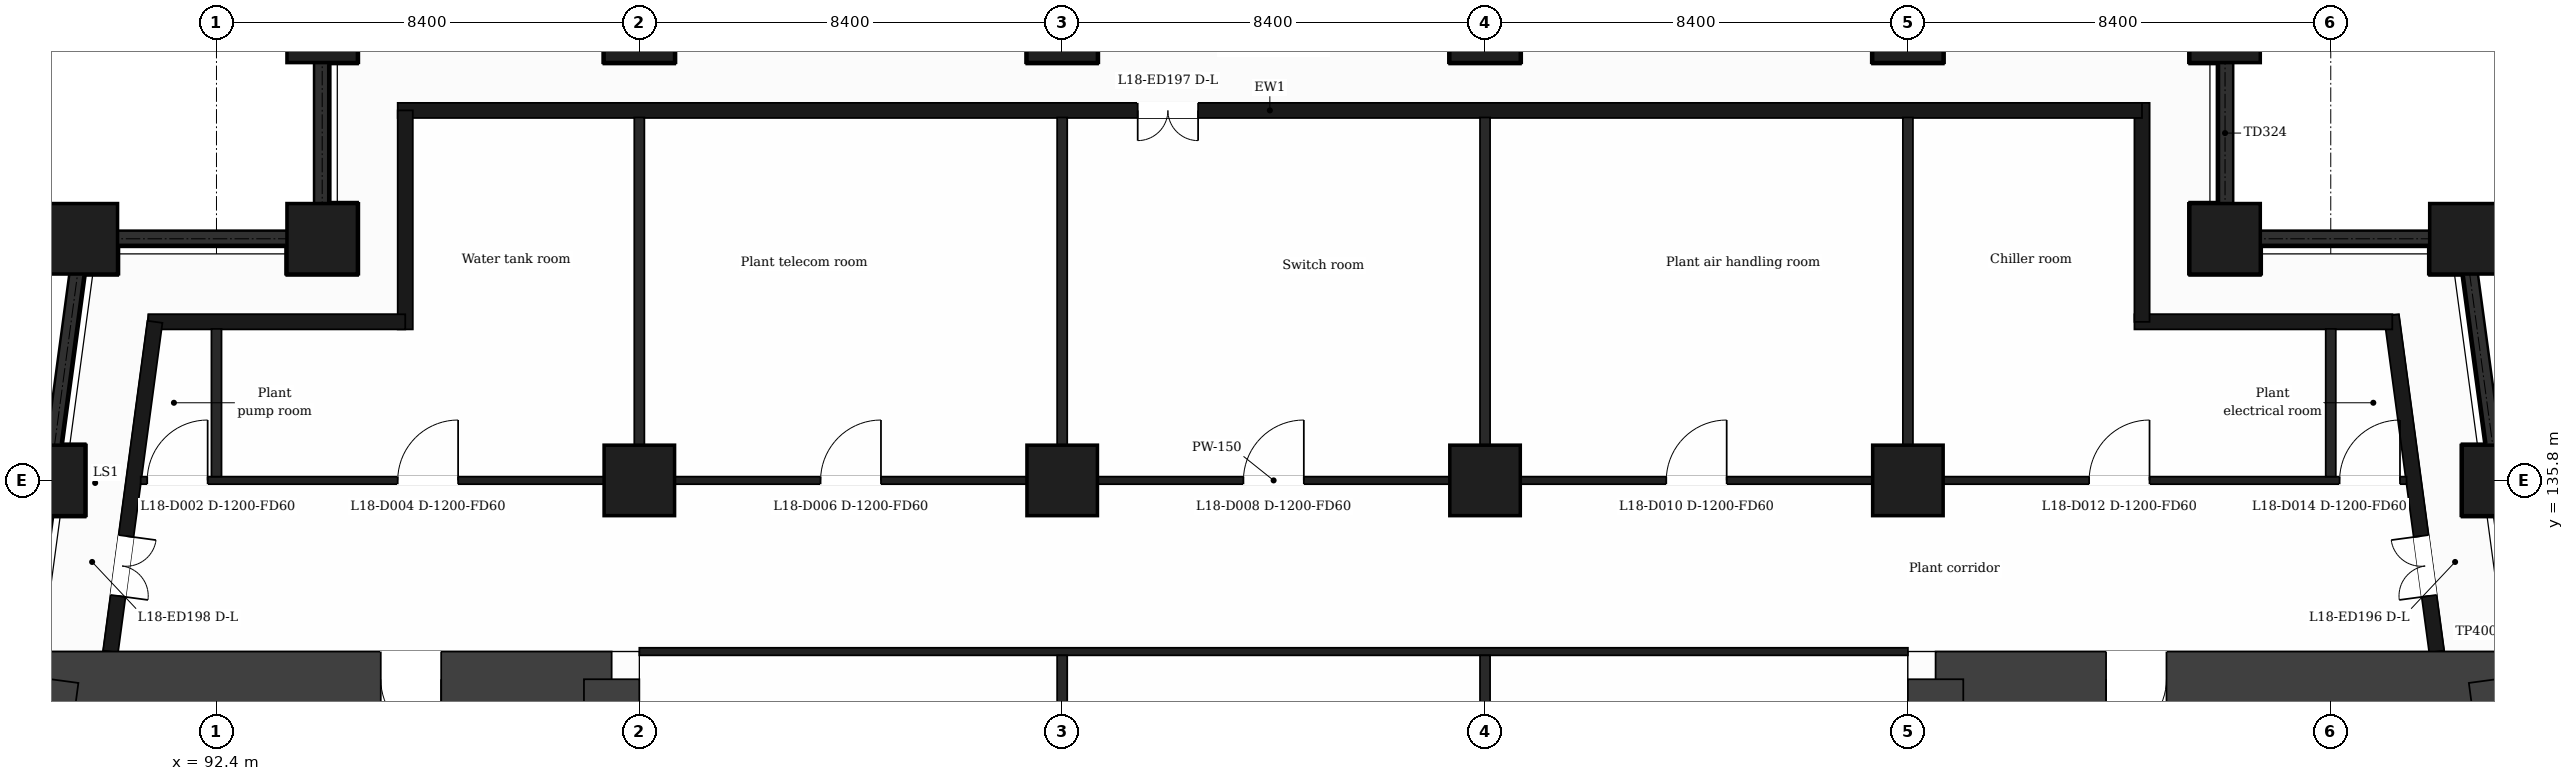
"""IFC4 building model, lengths in metres.
Left out: names, types, materials, properties, quantities, classifications, styles, units other than length and angle.
Written with IfcOpenShell. Run it as: python <this file> out.ifc"""

import sys

from ifc_helpers import new_model, si_unit, direction, frame, frame_2d, origin, origin_2d, place, context, subcontext, project, spatial, rectangle, extrude, element, fill, save


model = new_model("IFC4")
c1 = context("Model", 3, precision=1e-05, world=origin(), true_north=direction((0.0, 1.0)))
c2 = subcontext(c1, "Body", "Model", "MODEL_VIEW")
j1 = project(units=[si_unit("LENGTHUNIT", "METRE"), si_unit("PLANEANGLEUNIT", "RADIAN")], contexts=[c1])
p1 = place(None, origin())
s1 = spatial("IfcSite", under=j1, at=p1, CompositionType="ELEMENT")
p2 = place(p1, origin())
s2 = spatial("IfcBuilding", under=s1, at=p2, CompositionType="ELEMENT")
p3 = place(p2, frame((0.0, 0.0, 81.0)))
s3 = spatial("IfcBuildingStorey", under=s2, at=p3, CompositionType="ELEMENT", Elevation=81.0)
p4 = place(p3, frame((89.112, 131.85, 0.0), z_axis=(0.0, 0.0, 1.0), x_axis=(1.0, 0.0, 0.0)))
e1 = element("IfcWall", 1, at=p4, inside=s3, PredefinedType="SHEAR", context=c2, shape_type="SweptSolid", body=[
    extrude(rectangle(XDim=11.138, YDim=1.1, at=frame_2d((5.569, 0.0))), origin(), (0.0, 0.0, 1.0), 5.0),
])
p5 = place(p4, frame((6.552, 0.0, 0.0)))
e2 = element("IfcOpeningElement", 2, at=p5, cuts=e1, PredefinedType="OPENING", context=c2, shape_type="SweptSolid", body=[
    extrude(rectangle(XDim=1.2, YDim=2.1, at=frame_2d((0.6, 1.05))), frame((0.0, 0.56, 0.0), z_axis=(0.0, -1.0, 0.0), x_axis=(1.0, 0.0, 0.0)), (0.0, 0.0, 1.0), 1.12),
])
p6 = place(p3, frame((100.25, 131.85, 0.0), z_axis=(0.0, 0.0, 1.0), x_axis=(0.0, -1.0, 0.0)))
e3 = element("IfcWall", 3, at=p6, inside=s3, PredefinedType="SHEAR", context=c2, shape_type="SweptSolid", body=[
    extrude(rectangle(XDim=20.9, YDim=1.1, at=frame_2d((10.45, 0.0))), origin(), (0.0, 0.0, 1.0), 5.0),
])
p7 = place(p6, frame((18.55, 0.0, 0.0)))
e4 = element("IfcOpeningElement", 4, at=p7, cuts=e3, PredefinedType="OPENING", context=c2, shape_type="SweptSolid", body=[
    extrude(rectangle(XDim=1.2, YDim=2.1, at=frame_2d((0.6, 1.05))), frame((0.0, 0.56, 0.0), z_axis=(0.0, -1.0, 0.0), x_axis=(1.0, 0.0, 0.0)), (0.0, 0.0, 1.0), 1.12),
])
p8 = place(p6, frame((7.7, 0.0, 0.0)))
e5 = element("IfcOpeningElement", 5, at=p8, cuts=e3, PredefinedType="OPENING", context=c2, shape_type="SweptSolid", body=[
    extrude(rectangle(XDim=1.4, YDim=2.1, at=frame_2d((0.7, 1.05))), frame((0.0, 0.56, 0.0), z_axis=(0.0, -1.0, 0.0), x_axis=(1.0, 0.0, 0.0)), (0.0, 0.0, 1.0), 1.12),
])
p9 = place(p3, frame((86.298, 110.95, 0.0), z_axis=(0.0, 0.0, 1.0), x_axis=(0.133400422634, 0.99106222168, 0.0)))
e6 = element("IfcWall", 6, at=p9, inside=s3, PredefinedType="SHEAR", context=c2, shape_type="SweptSolid", body=[
    extrude(rectangle(XDim=21.089, YDim=1.1, at=frame_2d((10.544, 0.0))), origin(), (0.0, 0.0, 1.0), 5.0),
])
p10 = place(p3, frame((126.55, 131.85, 0.0), z_axis=(0.0, 0.0, 1.0), x_axis=(1.0, 0.0, 0.0)))
e7 = element("IfcWall", 7, at=p10, inside=s3, PredefinedType="SHEAR", context=c2, shape_type="SweptSolid", body=[
    extrude(rectangle(XDim=11.138, YDim=1.1, at=frame_2d((5.569, 0.0))), origin(), (0.0, 0.0, 1.0), 5.0),
])
p11 = place(p10, frame((3.386, 0.0, 0.0)))
e8 = element("IfcOpeningElement", 8, at=p11, cuts=e7, PredefinedType="OPENING", context=c2, shape_type="SweptSolid", body=[
    extrude(rectangle(XDim=1.2, YDim=2.1, at=frame_2d((0.6, 1.05))), frame((0.0, 0.56, 0.0), z_axis=(0.0, -1.0, 0.0), x_axis=(1.0, 0.0, 0.0)), (0.0, 0.0, 1.0), 1.12),
])
p12 = place(p3, frame((137.688, 131.85, 0.0), z_axis=(0.0, 0.0, 1.0), x_axis=(0.133411793472, -0.991060691059, 0.0)))
e9 = element("IfcWall", 9, at=p12, inside=s3, PredefinedType="SHEAR", context=c2, shape_type="SweptSolid", body=[
    extrude(rectangle(XDim=21.089, YDim=1.1, at=frame_2d((10.544, 0.0))), origin(), (0.0, 0.0, 1.0), 5.0),
])
p13 = place(p3, frame((126.55, 110.95, 0.0), z_axis=(0.0, 0.0, 1.0), x_axis=(0.0, 1.0, 0.0)))
e10 = element("IfcWall", 10, at=p13, inside=s3, PredefinedType="SHEAR", context=c2, shape_type="SweptSolid", body=[
    extrude(rectangle(XDim=20.9, YDim=1.1, at=frame_2d((10.45, 0.0))), origin(), (0.0, 0.0, 1.0), 5.0),
])
p14 = place(p13, frame((17.45, 0.0, 0.0)))
e11 = element("IfcOpeningElement", 11, at=p14, cuts=e10, PredefinedType="OPENING", context=c2, shape_type="SweptSolid", body=[
    extrude(rectangle(XDim=1.2, YDim=2.1, at=frame_2d((0.6, 1.05))), frame((0.0, 0.56, 0.0), z_axis=(0.0, -1.0, 0.0), x_axis=(1.0, 0.0, 0.0)), (0.0, 0.0, 1.0), 1.12),
])
p15 = place(p13, frame((11.8, 0.0, 0.0)))
e12 = element("IfcOpeningElement", 12, at=p15, cuts=e10, PredefinedType="OPENING", context=c2, shape_type="SweptSolid", body=[
    extrude(rectangle(XDim=1.4, YDim=2.1, at=frame_2d((0.7, 1.05))), frame((0.0, 0.56, 0.0), z_axis=(0.0, -1.0, 0.0), x_axis=(1.0, 0.0, 0.0)), (0.0, 0.0, 1.0), 1.12),
])
for number, where, z_axis, x_axis in (
    (13, (94.5, 140.6, 0.0), (0.0, 0.0, 1.0), (1.0, 0.0, 0.0)),
    (14, (132.3, 140.6, 0.0), (0.0, 0.0, 1.0), (1.0, 0.0, 0.0)),
    (15, (89.735, 140.6, 0.0), (0.0, 0.0, 1.0), (1.0, 0.0, 0.0)),
    (16, (137.065, 140.6, 0.0), (0.0, 0.0, 1.0), (1.0, 0.0, 0.0)),
    (17, (100.8, 135.8, 0.0), (0.0, 0.0, 1.0), (1.0, 0.0, 0.0)),
    (18, (109.2, 135.8, 0.0), (0.0, 0.0, 1.0), (1.0, 0.0, 0.0)),
    (19, (117.6, 135.8, 0.0), (0.0, 0.0, 1.0), (1.0, 0.0, 0.0)),
    (20, (126.0, 135.8, 0.0), (0.0, 0.0, 1.0), (1.0, 0.0, 0.0)),
    (21, (89.088, 135.8, 0.0), (0.0, 0.0, 1.0), (1.0, 0.0, 0.0)),
    (22, (137.711, 135.8, 0.0), (0.0, 0.0, 1.0), (1.0, 0.0, 0.0)),
    (23, (100.8, 144.8, 0.0), (0.0, 0.0, 1.0), (1.0, 0.0, 0.0)),
    (24, (109.2, 144.8, 0.0), (0.0, 0.0, 1.0), (1.0, 0.0, 0.0)),
    (25, (117.6, 144.8, 0.0), (0.0, 0.0, 1.0), (1.0, 0.0, 0.0)),
    (26, (126.0, 144.8, 0.0), (0.0, 0.0, 1.0), (1.0, 0.0, 0.0)),
    (27, (94.5, 144.8, 0.0), (0.0, 0.0, 1.0), (1.0, 0.0, 0.0)),
    (28, (132.3, 144.8, 0.0), (0.0, 0.0, 1.0), (1.0, 0.0, 0.0)),
):
    element("IfcColumn", number, at=place(p3, frame(where, z_axis=z_axis, x_axis=x_axis)), inside=s3, PredefinedType="COLUMN", context=c2, shape_type="SweptSolid", body=[
        extrude(rectangle(XDim=1.4, YDim=1.4, at=origin_2d()), origin(), (0.0, 0.0, 1.0), 5.0),
    ])
p16 = place(p3, frame((136.504, 132.4, 0.0), z_axis=(0.0, 0.0, 1.0), x_axis=(-0.133399697462, 0.99106231929, 0.0)))
e29 = element("IfcWall", 29, at=p16, inside=s3, PredefinedType="SOLIDWALL", context=c2, shape_type="SweptSolid", body=[
    extrude(rectangle(XDim=6.74, YDim=0.3, at=frame_2d((3.37, 0.0))), origin(), (0.0, 0.0, 1.0), 4.55),
])
p17 = place(p16, frame((1.115, 0.0, 0.0)))
e30 = element("IfcOpeningElement", 30, at=p17, cuts=e29, PredefinedType="OPENING", context=c2, shape_type="SweptSolid", body=[
    extrude(rectangle(XDim=1.2, YDim=2.4, at=frame_2d((0.6, 1.2))), frame((0.0, 0.16, 0.0), z_axis=(0.0, -1.0, 0.0), x_axis=(1.0, 0.0, 0.0)), (0.0, 0.0, 1.0), 0.32),
])
p18 = place(p3, frame((135.623, 138.95, 0.0), z_axis=(0.0, 0.0, 1.0), x_axis=(-1.0, 0.0, 0.0)))
e31 = element("IfcWall", 31, at=p18, inside=s3, PredefinedType="SOLIDWALL", context=c2, shape_type="SweptSolid", body=[
    extrude(rectangle(XDim=5.123, YDim=0.3, at=frame_2d((2.561, 0.0))), origin(), (0.0, 0.0, 1.0), 4.55),
])
p19 = place(p3, frame((130.65, 138.95, 0.0), z_axis=(0.0, 0.0, 1.0), x_axis=(0.0, 1.0, 0.0)))
e32 = element("IfcWall", 32, at=p19, inside=s3, PredefinedType="SOLIDWALL", context=c2, shape_type="SweptSolid", body=[
    extrude(rectangle(XDim=4.35, YDim=0.3, at=frame_2d((2.175, 0.0))), origin(), (0.0, 0.0, 1.0), 4.55),
])
p20 = place(p3, frame((130.65, 143.15, 0.0), z_axis=(0.0, 0.0, 1.0), x_axis=(-1.0, 0.0, 0.0)))
e33 = element("IfcWall", 33, at=p20, inside=s3, PredefinedType="SOLIDWALL", context=c2, shape_type="SweptSolid", body=[
    extrude(rectangle(XDim=34.65, YDim=0.3, at=frame_2d((17.325, 0.0))), origin(), (0.0, 0.0, 1.0), 4.55),
])
p21 = place(p20, frame((18.75, 0.0, 0.0)))
e34 = element("IfcOpeningElement", 34, at=p21, cuts=e33, PredefinedType="OPENING", context=c2, shape_type="SweptSolid", body=[
    extrude(rectangle(XDim=1.2, YDim=2.4, at=frame_2d((0.6, 1.2))), frame((0.0, 0.16, 0.0), z_axis=(0.0, -1.0, 0.0), x_axis=(1.0, 0.0, 0.0)), (0.0, 0.0, 1.0), 0.32),
])
p22 = place(p3, frame((96.15, 143.15, 0.0), z_axis=(0.0, 0.0, 1.0), x_axis=(0.0, -1.0, 0.0)))
e35 = element("IfcWall", 35, at=p22, inside=s3, PredefinedType="SOLIDWALL", context=c2, shape_type="SweptSolid", body=[
    extrude(rectangle(XDim=4.35, YDim=0.3, at=frame_2d((2.175, 0.0))), origin(), (0.0, 0.0, 1.0), 4.55),
])
p23 = place(p3, frame((96.15, 138.95, 0.0), z_axis=(0.0, 0.0, 1.0), x_axis=(-1.0, 0.0, 0.0)))
e36 = element("IfcWall", 36, at=p23, inside=s3, PredefinedType="SOLIDWALL", context=c2, shape_type="SweptSolid", body=[
    extrude(rectangle(XDim=5.104, YDim=0.3, at=frame_2d((2.552, 0.0))), origin(), (0.0, 0.0, 1.0), 4.55),
])
p24 = place(p3, frame((91.177, 138.95, 0.0), z_axis=(0.0, 0.0, 1.0), x_axis=(-0.133426664613, -0.991058689065, 0.0)))
e37 = element("IfcWall", 37, at=p24, inside=s3, PredefinedType="SOLIDWALL", context=c2, shape_type="SweptSolid", body=[
    extrude(rectangle(XDim=6.609, YDim=0.3, at=frame_2d((3.305, 0.0))), origin(), (0.0, 0.0, 1.0), 4.55),
])
p25 = place(p24, frame((4.294, 0.0, 0.0)))
e38 = element("IfcOpeningElement", 38, at=p25, cuts=e37, PredefinedType="OPENING", context=c2, shape_type="SweptSolid", body=[
    extrude(rectangle(XDim=1.2, YDim=2.4, at=frame_2d((0.6, 1.2))), frame((0.0, 0.16, 0.0), z_axis=(0.0, -1.0, 0.0), x_axis=(1.0, 0.0, 0.0)), (0.0, 0.0, 1.0), 0.32),
])
p26 = place(p3, frame((100.8, 132.4, 0.0), z_axis=(0.0, 0.0, 1.0), x_axis=(1.0, 0.0, 0.0)))
e39 = element("IfcWall", 39, at=p26, inside=s3, PredefinedType="PARTITIONING", context=c2, shape_type="SweptSolid", body=[
    extrude(rectangle(XDim=25.2, YDim=0.15, at=frame_2d((12.6, 0.0))), origin(), (0.0, 0.0, 1.0), 4.55),
])
p27 = place(p3, frame((90.895, 135.8, 0.0), z_axis=(0.0, 0.0, 1.0), x_axis=(1.0, 0.0, 0.0)))
e40 = element("IfcWall", 40, at=p27, inside=s3, PredefinedType="PARTITIONING", context=c2, shape_type="SweptSolid", body=[
    extrude(rectangle(XDim=45.011, YDim=0.15, at=frame_2d((22.505, 0.0))), origin(), (0.0, 0.0, 1.0), 4.55),
])
p28 = place(p27, frame((0.13, 0.0, 0.0)))
e41 = element("IfcOpeningElement", 41, at=p28, cuts=e40, PredefinedType="OPENING", context=c2, shape_type="SweptSolid", body=[
    extrude(rectangle(XDim=1.2, YDim=2.1, at=frame_2d((0.6, 1.05))), frame((0.0, 0.085, 0.0), z_axis=(0.0, -1.0, 0.0), x_axis=(1.0, 0.0, 0.0)), (0.0, 0.0, 1.0), 0.17),
])
p29 = place(p27, frame((5.105, 0.0, 0.0)))
e42 = element("IfcOpeningElement", 42, at=p29, cuts=e40, PredefinedType="OPENING", context=c2, shape_type="SweptSolid", body=[
    extrude(rectangle(XDim=1.2, YDim=2.1, at=frame_2d((0.6, 1.05))), frame((0.0, 0.085, 0.0), z_axis=(0.0, -1.0, 0.0), x_axis=(1.0, 0.0, 0.0)), (0.0, 0.0, 1.0), 0.17),
])
p30 = place(p27, frame((13.505, 0.0, 0.0)))
e43 = element("IfcOpeningElement", 43, at=p30, cuts=e40, PredefinedType="OPENING", context=c2, shape_type="SweptSolid", body=[
    extrude(rectangle(XDim=1.2, YDim=2.1, at=frame_2d((0.6, 1.05))), frame((0.0, 0.085, 0.0), z_axis=(0.0, -1.0, 0.0), x_axis=(1.0, 0.0, 0.0)), (0.0, 0.0, 1.0), 0.17),
])
p31 = place(p27, frame((21.906, 0.0, 0.0)))
e44 = element("IfcOpeningElement", 44, at=p31, cuts=e40, PredefinedType="OPENING", context=c2, shape_type="SweptSolid", body=[
    extrude(rectangle(XDim=1.2, YDim=2.1, at=frame_2d((0.6, 1.05))), frame((0.0, 0.085, 0.0), z_axis=(0.0, -1.0, 0.0), x_axis=(1.0, 0.0, 0.0)), (0.0, 0.0, 1.0), 0.17),
])
p32 = place(p27, frame((30.305, 0.0, 0.0)))
e45 = element("IfcOpeningElement", 45, at=p32, cuts=e40, PredefinedType="OPENING", context=c2, shape_type="SweptSolid", body=[
    extrude(rectangle(XDim=1.2, YDim=2.1, at=frame_2d((0.6, 1.05))), frame((0.0, 0.085, 0.0), z_axis=(0.0, -1.0, 0.0), x_axis=(1.0, 0.0, 0.0)), (0.0, 0.0, 1.0), 0.17),
])
p33 = place(p27, frame((38.705, 0.0, 0.0)))
e46 = element("IfcOpeningElement", 46, at=p33, cuts=e40, PredefinedType="OPENING", context=c2, shape_type="SweptSolid", body=[
    extrude(rectangle(XDim=1.2, YDim=2.1, at=frame_2d((0.6, 1.05))), frame((0.0, 0.085, 0.0), z_axis=(0.0, -1.0, 0.0), x_axis=(1.0, 0.0, 0.0)), (0.0, 0.0, 1.0), 0.17),
])
p34 = place(p27, frame((43.681, 0.0, 0.0)))
e47 = element("IfcOpeningElement", 47, at=p34, cuts=e40, PredefinedType="OPENING", context=c2, shape_type="SweptSolid", body=[
    extrude(rectangle(XDim=1.2, YDim=2.1, at=frame_2d((0.6, 1.05))), frame((0.0, 0.085, 0.0), z_axis=(0.0, -1.0, 0.0), x_axis=(1.0, 0.0, 0.0)), (0.0, 0.0, 1.0), 0.17),
])
p35 = place(p3, frame((92.4, 135.875, 0.0), z_axis=(0.0, 0.0, 1.0), x_axis=(0.0, 1.0, 0.0)))
e48 = element("IfcWall", 48, at=p35, inside=s3, PredefinedType="PARTITIONING", context=c2, shape_type="SweptSolid", body=[
    extrude(rectangle(XDim=2.935, YDim=0.2, at=frame_2d((1.468, 0.0))), origin(), (0.0, 0.0, 1.0), 4.55),
])
p36 = place(p3, frame((100.8, 135.875, 0.0), z_axis=(0.0, 0.0, 1.0), x_axis=(0.0, 1.0, 0.0)))
e49 = element("IfcWall", 49, at=p36, inside=s3, PredefinedType="PARTITIONING", context=c2, shape_type="SweptSolid", body=[
    extrude(rectangle(XDim=7.135, YDim=0.2, at=frame_2d((3.567, 0.0))), origin(), (0.0, 0.0, 1.0), 4.55),
])
p37 = place(p3, frame((109.2, 124.875, 0.0), z_axis=(0.0, 0.0, 1.0), x_axis=(0.0, 1.0, 0.0)))
e50 = element("IfcWall", 50, at=p37, inside=s3, PredefinedType="PARTITIONING", context=c2, shape_type="SweptSolid", body=[
    extrude(rectangle(XDim=7.45, YDim=0.2, at=frame_2d((3.725, 0.0))), origin(), (0.0, 0.0, 1.0), 4.55),
])
p38 = place(p3, frame((109.2, 135.875, 0.0), z_axis=(0.0, 0.0, 1.0), x_axis=(0.0, 1.0, 0.0)))
e51 = element("IfcWall", 51, at=p38, inside=s3, PredefinedType="PARTITIONING", context=c2, shape_type="SweptSolid", body=[
    extrude(rectangle(XDim=7.135, YDim=0.2, at=frame_2d((3.567, 0.0))), origin(), (0.0, 0.0, 1.0), 4.55),
])
p39 = place(p3, frame((117.6, 124.875, 0.0), z_axis=(0.0, 0.0, 1.0), x_axis=(0.0, 1.0, 0.0)))
e52 = element("IfcWall", 52, at=p39, inside=s3, PredefinedType="PARTITIONING", context=c2, shape_type="SweptSolid", body=[
    extrude(rectangle(XDim=7.45, YDim=0.2, at=frame_2d((3.725, 0.0))), origin(), (0.0, 0.0, 1.0), 4.55),
])
for number, where, z_axis, x_axis in (
    (53, (117.6, 135.875, 0.0), (0.0, 0.0, 1.0), (0.0, 1.0, 0.0)),
    (54, (126.0, 135.875, 0.0), (0.0, 0.0, 1.0), (0.0, 1.0, 0.0)),
):
    element("IfcWall", number, at=place(p3, frame(where, z_axis=z_axis, x_axis=x_axis)), inside=s3, PredefinedType="PARTITIONING", context=c2, shape_type="SweptSolid", body=[
        extrude(rectangle(XDim=7.135, YDim=0.2, at=frame_2d((3.567, 0.0))), origin(), (0.0, 0.0, 1.0), 4.55),
    ])
p40 = place(p3, frame((134.4, 135.875, 0.0), z_axis=(0.0, 0.0, 1.0), x_axis=(0.0, 1.0, 0.0)))
e55 = element("IfcWall", 55, at=p40, inside=s3, PredefinedType="PARTITIONING", context=c2, shape_type="SweptSolid", body=[
    extrude(rectangle(XDim=2.935, YDim=0.2, at=frame_2d((1.468, 0.0))), origin(), (0.0, 0.0, 1.0), 4.55),
])
p41 = place(p17, origin())
e56 = element("IfcDoor", 56, at=p41, inside=s3, OperationType="DOUBLE_DOOR_SINGLE_SWING", PredefinedType="DOOR", context=c2, shape_type="SweptSolid", body=[
    extrude(rectangle(XDim=1.2, YDim=2.4, at=frame_2d((0.6, 1.2))), frame((0.0, 0.025, 0.0), z_axis=(0.0, -1.0, 0.0), x_axis=(1.0, 0.0, 0.0)), (0.0, 0.0, 1.0), 0.05),
])
fill(e30, e56)
p42 = place(p21, origin())
e57 = element("IfcDoor", 57, at=p42, inside=s3, OperationType="DOUBLE_DOOR_SINGLE_SWING", PredefinedType="DOOR", context=c2, shape_type="SweptSolid", body=[
    extrude(rectangle(XDim=1.2, YDim=2.4, at=frame_2d((0.6, 1.2))), frame((0.0, 0.025, 0.0), z_axis=(0.0, -1.0, 0.0), x_axis=(1.0, 0.0, 0.0)), (0.0, 0.0, 1.0), 0.05),
])
fill(e34, e57)
p43 = place(p25, origin())
e58 = element("IfcDoor", 58, at=p43, inside=s3, OperationType="DOUBLE_DOOR_SINGLE_SWING", PredefinedType="DOOR", context=c2, shape_type="SweptSolid", body=[
    extrude(rectangle(XDim=1.2, YDim=2.4, at=frame_2d((0.6, 1.2))), frame((0.0, 0.025, 0.0), z_axis=(0.0, -1.0, 0.0), x_axis=(1.0, 0.0, 0.0)), (0.0, 0.0, 1.0), 0.05),
])
fill(e38, e58)
p44 = place(p28, origin())
e59 = element("IfcDoor", 59, at=p44, inside=s3, OperationType="SINGLE_SWING_RIGHT", PredefinedType="DOOR", context=c2, shape_type="SweptSolid", body=[
    extrude(rectangle(XDim=1.2, YDim=2.1, at=frame_2d((0.6, 1.05))), frame((0.0, 0.025, 0.0), z_axis=(0.0, -1.0, 0.0), x_axis=(1.0, 0.0, 0.0)), (0.0, 0.0, 1.0), 0.05),
])
fill(e41, e59)
p45 = place(p29, origin())
e60 = element("IfcDoor", 60, at=p45, inside=s3, OperationType="SINGLE_SWING_RIGHT", PredefinedType="DOOR", context=c2, shape_type="SweptSolid", body=[
    extrude(rectangle(XDim=1.2, YDim=2.1, at=frame_2d((0.6, 1.05))), frame((0.0, 0.025, 0.0), z_axis=(0.0, -1.0, 0.0), x_axis=(1.0, 0.0, 0.0)), (0.0, 0.0, 1.0), 0.05),
])
fill(e42, e60)
p46 = place(p30, origin())
e61 = element("IfcDoor", 61, at=p46, inside=s3, OperationType="SINGLE_SWING_RIGHT", PredefinedType="DOOR", context=c2, shape_type="SweptSolid", body=[
    extrude(rectangle(XDim=1.2, YDim=2.1, at=frame_2d((0.6, 1.05))), frame((0.0, 0.025, 0.0), z_axis=(0.0, -1.0, 0.0), x_axis=(1.0, 0.0, 0.0)), (0.0, 0.0, 1.0), 0.05),
])
fill(e43, e61)
p47 = place(p31, origin())
e62 = element("IfcDoor", 62, at=p47, inside=s3, OperationType="SINGLE_SWING_RIGHT", PredefinedType="DOOR", context=c2, shape_type="SweptSolid", body=[
    extrude(rectangle(XDim=1.2, YDim=2.1, at=frame_2d((0.6, 1.05))), frame((0.0, 0.025, 0.0), z_axis=(0.0, -1.0, 0.0), x_axis=(1.0, 0.0, 0.0)), (0.0, 0.0, 1.0), 0.05),
])
fill(e44, e62)
p48 = place(p32, origin())
e63 = element("IfcDoor", 63, at=p48, inside=s3, OperationType="SINGLE_SWING_RIGHT", PredefinedType="DOOR", context=c2, shape_type="SweptSolid", body=[
    extrude(rectangle(XDim=1.2, YDim=2.1, at=frame_2d((0.6, 1.05))), frame((0.0, 0.025, 0.0), z_axis=(0.0, -1.0, 0.0), x_axis=(1.0, 0.0, 0.0)), (0.0, 0.0, 1.0), 0.05),
])
fill(e45, e63)
p49 = place(p33, origin())
e64 = element("IfcDoor", 64, at=p49, inside=s3, OperationType="SINGLE_SWING_RIGHT", PredefinedType="DOOR", context=c2, shape_type="SweptSolid", body=[
    extrude(rectangle(XDim=1.2, YDim=2.1, at=frame_2d((0.6, 1.05))), frame((0.0, 0.025, 0.0), z_axis=(0.0, -1.0, 0.0), x_axis=(1.0, 0.0, 0.0)), (0.0, 0.0, 1.0), 0.05),
])
fill(e46, e64)
p50 = place(p34, origin())
e65 = element("IfcDoor", 65, at=p50, inside=s3, OperationType="SINGLE_SWING_RIGHT", PredefinedType="DOOR", context=c2, shape_type="SweptSolid", body=[
    extrude(rectangle(XDim=1.2, YDim=2.1, at=frame_2d((0.6, 1.05))), frame((0.0, 0.025, 0.0), z_axis=(0.0, -1.0, 0.0), x_axis=(1.0, 0.0, 0.0)), (0.0, 0.0, 1.0), 0.05),
])
fill(e47, e65)
p51 = place(p5, origin())
e66 = element("IfcDoor", 66, at=p51, inside=s3, OperationType="SINGLE_SWING_RIGHT", PredefinedType="DOOR", context=c2, shape_type="SweptSolid", body=[
    extrude(rectangle(XDim=1.2, YDim=2.1, at=frame_2d((0.6, 1.05))), frame((0.0, 0.025, 0.0), z_axis=(0.0, -1.0, 0.0), x_axis=(1.0, 0.0, 0.0)), (0.0, 0.0, 1.0), 0.05),
])
fill(e2, e66)
p52 = place(p11, origin())
e67 = element("IfcDoor", 67, at=p52, inside=s3, OperationType="SINGLE_SWING_LEFT", PredefinedType="DOOR", context=c2, shape_type="SweptSolid", body=[
    extrude(rectangle(XDim=1.2, YDim=2.1, at=frame_2d((0.6, 1.05))), frame((0.0, 0.025, 0.0), z_axis=(0.0, -1.0, 0.0), x_axis=(1.0, 0.0, 0.0)), (0.0, 0.0, 1.0), 0.05),
])
fill(e8, e67)
save(model, sys.argv[1])
